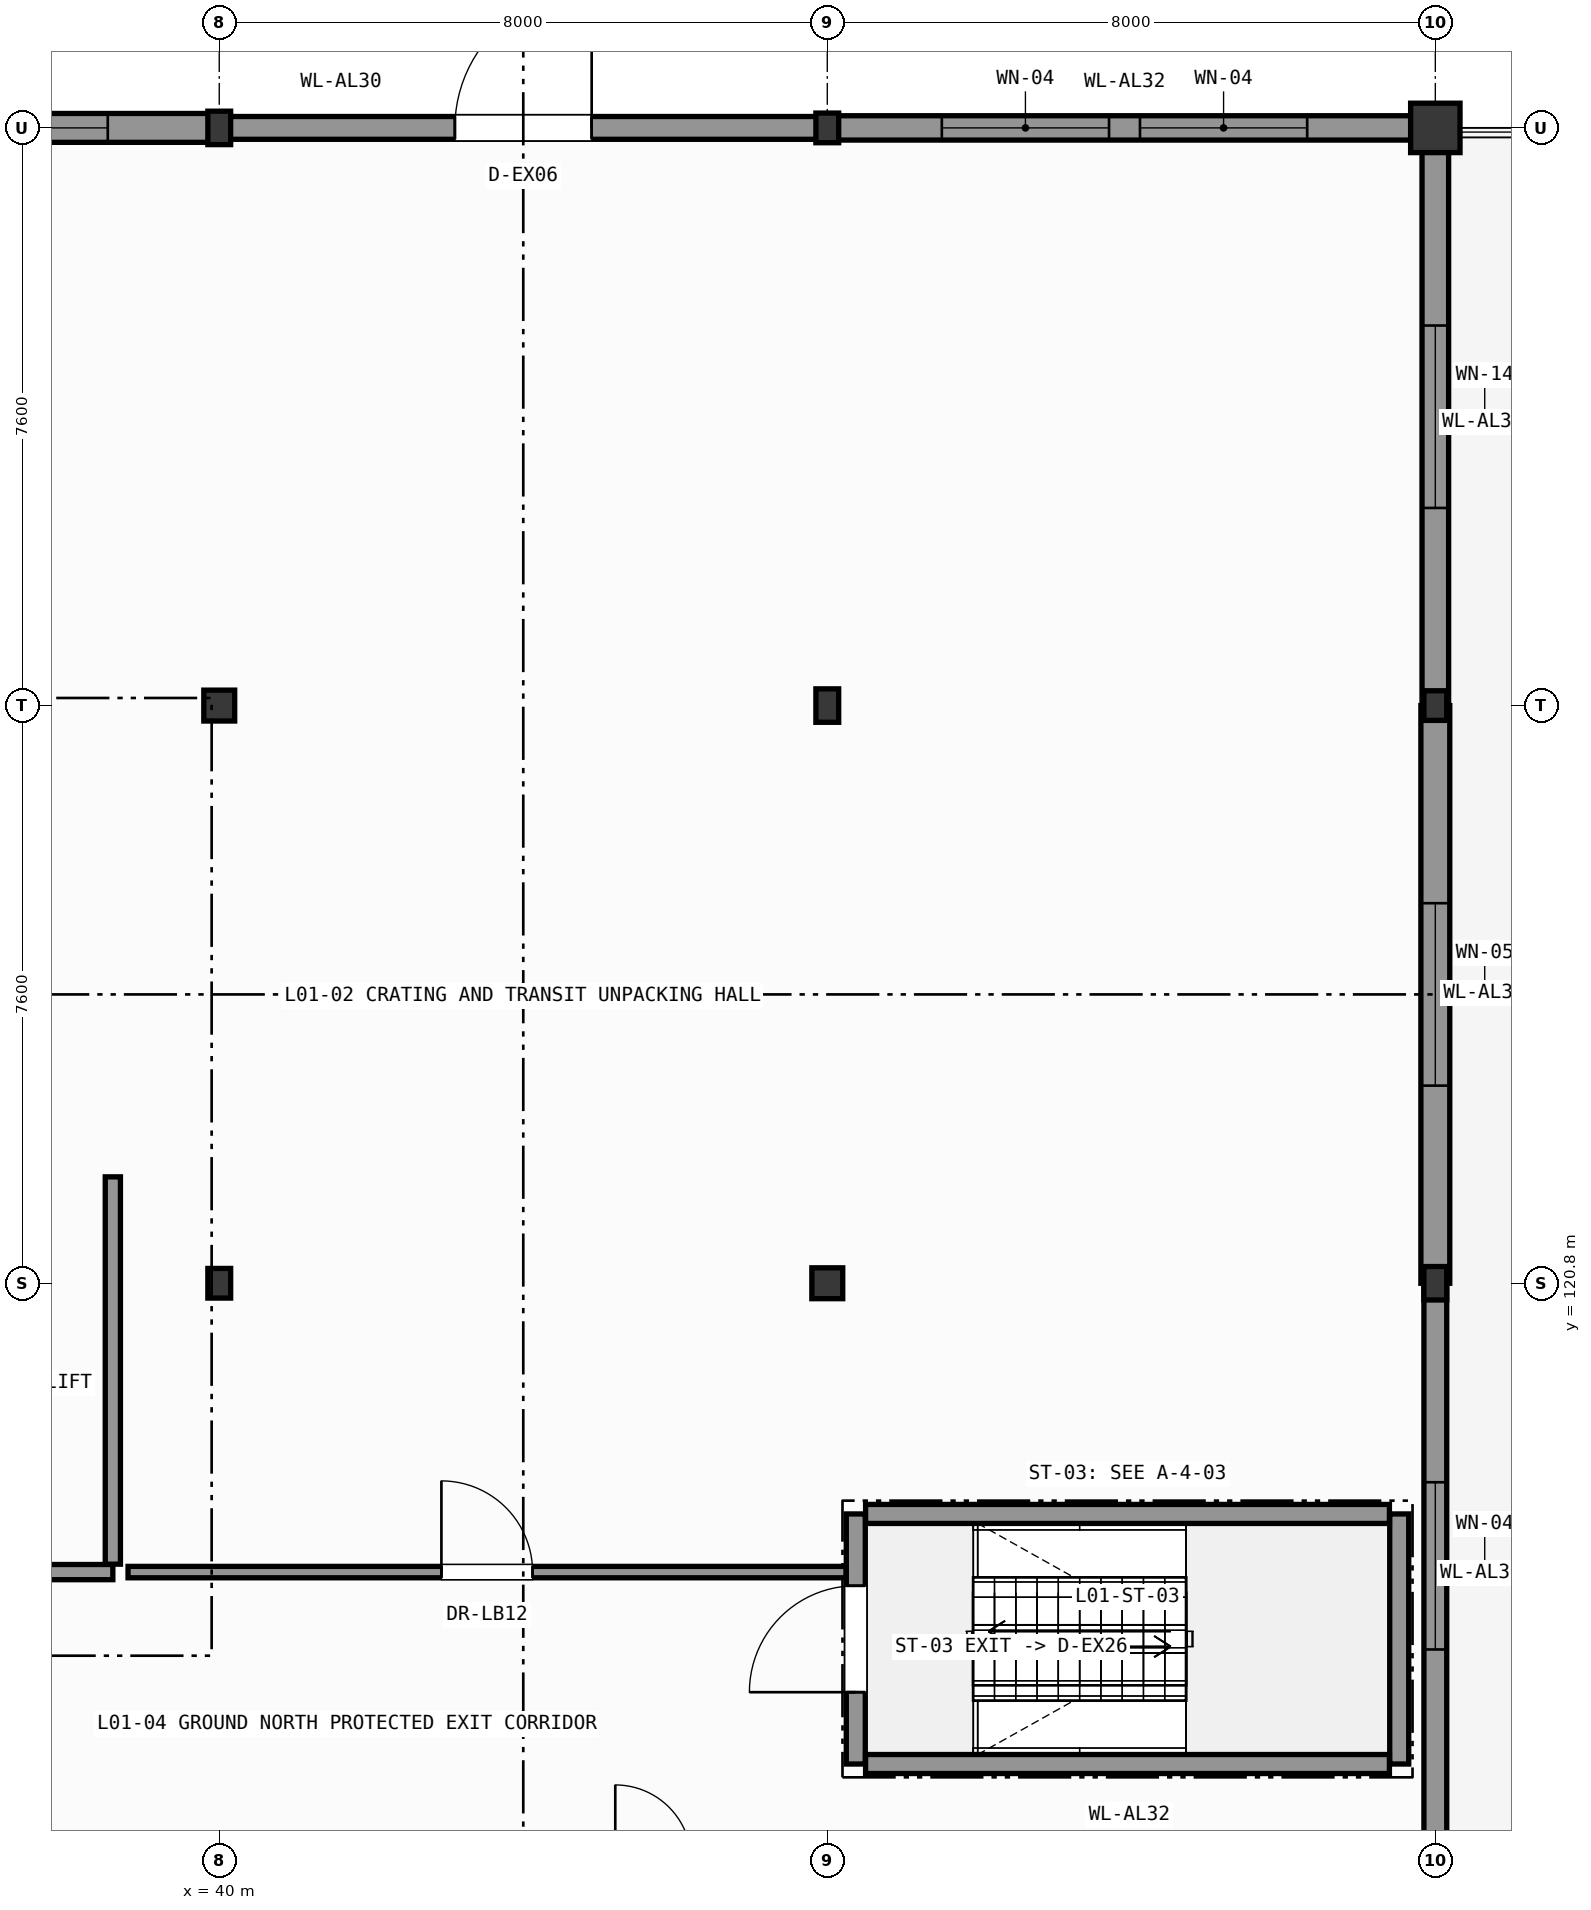
"""IFC4 building model, lengths in metres.
Left out: names, types, materials, properties, quantities, classifications, styles, units other than length and angle.
Written with IfcOpenShell. Run it as: python <this file> out.ifc"""

import sys

from ifc_helpers import new_model, si_unit, direction, frame, frame_2d, origin, origin_2d, place, context, subcontext, project, spatial, rectangle, hollow_circle, i_section, extrude, element, fill, save


model = new_model("IFC4")
c1 = context("Model", 3, precision=1e-05, world=origin(), true_north=direction((0.0, 1.0)))
c2 = subcontext(c1, "Body", "Model", "MODEL_VIEW")
j1 = project(units=[si_unit("LENGTHUNIT", "METRE"), si_unit("PLANEANGLEUNIT", "RADIAN")], contexts=[c1])
p1 = place(None, origin())
s1 = spatial("IfcSite", under=j1, at=p1, CompositionType="ELEMENT")
p2 = place(p1, origin())
s2 = spatial("IfcBuilding", under=s1, at=p2, CompositionType="ELEMENT")
p3 = place(p2, origin())
s3 = spatial("IfcBuildingStorey", under=s2, at=p3, CompositionType="ELEMENT", Elevation=0.0)
p4 = place(p3, frame((40.0, 120.8, 0.0), z_axis=(0.0, 0.0, 1.0), x_axis=(1.0, 0.0, 0.0)))
e1 = element("IfcColumn", 1, at=p4, inside=s3, PredefinedType="COLUMN", context=c2, shape_type="SweptSolid", body=[
    extrude(i_section(OverallWidth=0.3, OverallDepth=0.39, WebThickness=0.011, FlangeThickness=0.019, FilletRadius=0.027, at=origin_2d()), origin(), (0.0, 0.0, 1.0), 7.8),
])
p5 = place(p3, frame((40.0, 128.4, 0.0), z_axis=(0.0, 0.0, 1.0), x_axis=(1.0, 0.0, 0.0)))
e2 = element("IfcColumn", 2, at=p5, inside=s3, PredefinedType="COLUMN", context=c2, shape_type="SweptSolid", body=[
    extrude(hollow_circle(Radius=0.203, WallThickness=0.02, at=origin_2d()), origin(), (0.0, 0.0, 1.0), 7.8),
])
p6 = place(p3, frame((40.0, 136.0, 0.0), z_axis=(0.0, 0.0, 1.0), x_axis=(1.0, 0.0, 0.0)))
e3 = element("IfcColumn", 3, at=p6, inside=s3, PredefinedType="COLUMN", context=c2, shape_type="SweptSolid", body=[
    extrude(i_section(OverallWidth=0.3, OverallDepth=0.44, WebThickness=0.011, FlangeThickness=0.021, FilletRadius=0.027, at=origin_2d()), origin(), (0.0, 0.0, 1.0), 7.8),
])
p7 = place(p3, frame((48.0, 120.8, 0.0), z_axis=(0.0, 0.0, 1.0), x_axis=(1.0, 0.0, 0.0)))
e4 = element("IfcColumn", 4, at=p7, inside=s3, PredefinedType="COLUMN", context=c2, shape_type="SweptSolid", body=[
    extrude(hollow_circle(Radius=0.203, WallThickness=0.02, at=origin_2d()), origin(), (0.0, 0.0, 1.0), 7.8),
])
p8 = place(p3, frame((48.0, 128.4, 0.0), z_axis=(0.0, 0.0, 1.0), x_axis=(1.0, 0.0, 0.0)))
e5 = element("IfcColumn", 5, at=p8, inside=s3, PredefinedType="COLUMN", context=c2, shape_type="SweptSolid", body=[
    extrude(i_section(OverallWidth=0.3, OverallDepth=0.44, WebThickness=0.011, FlangeThickness=0.021, FilletRadius=0.027, at=origin_2d()), origin(), (0.0, 0.0, 1.0), 7.8),
])
p9 = place(p3, frame((48.0, 136.0, 0.0), z_axis=(0.0, 0.0, 1.0), x_axis=(1.0, 0.0, 0.0)))
e6 = element("IfcColumn", 6, at=p9, inside=s3, PredefinedType="COLUMN", context=c2, shape_type="SweptSolid", body=[
    extrude(i_section(OverallWidth=0.3, OverallDepth=0.39, WebThickness=0.011, FlangeThickness=0.019, FilletRadius=0.027, at=origin_2d()), origin(), (0.0, 0.0, 1.0), 7.8),
])
p10 = place(p3, frame((56.0, 120.8, 0.0), z_axis=(0.0, 0.0, 1.0), x_axis=(1.0, 0.0, 0.0)))
e7 = element("IfcColumn", 7, at=p10, inside=s3, PredefinedType="COLUMN", context=c2, shape_type="SweptSolid", body=[
    extrude(i_section(OverallWidth=0.3, OverallDepth=0.44, WebThickness=0.011, FlangeThickness=0.021, FilletRadius=0.027, at=origin_2d()), origin(), (0.0, 0.0, 1.0), 7.8),
])
p11 = place(p3, frame((56.0, 128.4, 0.0), z_axis=(0.0, 0.0, 1.0), x_axis=(1.0, 0.0, 0.0)))
e8 = element("IfcColumn", 8, at=p11, inside=s3, PredefinedType="COLUMN", context=c2, shape_type="SweptSolid", body=[
    extrude(i_section(OverallWidth=0.3, OverallDepth=0.39, WebThickness=0.011, FlangeThickness=0.019, FilletRadius=0.027, at=origin_2d()), origin(), (0.0, 0.0, 1.0), 7.8),
])
p12 = place(p3, frame((56.0, 136.0, 0.0), z_axis=(0.0, 0.0, 1.0), x_axis=(1.0, 0.0, 0.0)))
e9 = element("IfcColumn", 9, at=p12, inside=s3, PredefinedType="PILASTER", context=c2, shape_type="SweptSolid", body=[
    extrude(rectangle(XDim=0.65, YDim=0.65, at=origin_2d()), origin(), (0.0, 0.0, 1.0), 7.8),
])
p13 = place(p3, frame((56.0, 120.8, 0.0), z_axis=(0.0, 0.0, 1.0), x_axis=(0.0, -1.0, 0.0)))
e10 = element("IfcWall", 10, at=p13, inside=s3, PredefinedType="SOLIDWALL", context=c2, shape_type="SweptSolid", body=[
    extrude(rectangle(XDim=7.436, YDim=0.3, at=frame_2d((3.718, 0.0))), origin(), (0.0, 0.0, 1.0), 6.965),
])
p14 = place(p13, frame((2.618, 0.0, 0.95)))
e11 = element("IfcOpeningElement", 11, at=p14, cuts=e10, PredefinedType="OPENING", context=c2, shape_type="SweptSolid", body=[
    extrude(rectangle(XDim=2.2, YDim=4.2, at=frame_2d((1.1, 2.1))), frame((0.0, 0.16, 0.0), z_axis=(0.0, -1.0, 0.0), x_axis=(1.0, 0.0, 0.0)), (0.0, 0.0, 1.0), 0.32),
])
p15 = place(p3, frame((56.0, 128.4, 0.0), z_axis=(0.0, 0.0, 1.0), x_axis=(0.0, -1.0, 0.0)))
e12 = element("IfcWall", 12, at=p15, inside=s3, PredefinedType="SOLIDWALL", context=c2, shape_type="SweptSolid", body=[
    extrude(rectangle(XDim=7.6, YDim=0.38, at=frame_2d((3.8, 0.0))), origin(), (0.0, 0.0, 1.0), 6.965),
])
p16 = place(p15, frame((2.6, 0.0, 0.95)))
e13 = element("IfcOpeningElement", 13, at=p16, cuts=e12, PredefinedType="OPENING", context=c2, shape_type="SweptSolid", body=[
    extrude(rectangle(XDim=2.4, YDim=4.6, at=frame_2d((1.2, 2.3))), frame((0.0, 0.2, 0.0), z_axis=(0.0, -1.0, 0.0), x_axis=(1.0, 0.0, 0.0)), (0.0, 0.0, 1.0), 0.4),
])
p17 = place(p3, frame((56.0, 136.0, 0.0), z_axis=(0.0, 0.0, 1.0), x_axis=(0.0, -1.0, 0.0)))
e14 = element("IfcWall", 14, at=p17, inside=s3, PredefinedType="SOLIDWALL", context=c2, shape_type="SweptSolid", body=[
    extrude(rectangle(XDim=7.6, YDim=0.35, at=frame_2d((3.8, 0.0))), origin(), (0.0, 0.0, 1.0), 6.965),
])
p18 = place(p17, frame((2.6, 0.0, 0.95)))
e15 = element("IfcOpeningElement", 15, at=p18, cuts=e14, PredefinedType="OPENING", context=c2, shape_type="SweptSolid", body=[
    extrude(rectangle(XDim=2.4, YDim=3.0, at=frame_2d((1.2, 1.5))), frame((0.0, 0.185, 0.0), z_axis=(0.0, -1.0, 0.0), x_axis=(1.0, 0.0, 0.0)), (0.0, 0.0, 1.0), 0.37),
])
p19 = place(p3, frame((48.0, 136.0, 0.0), z_axis=(0.0, 0.0, 1.0), x_axis=(1.0, 0.0, 0.0)))
e16 = element("IfcWall", 16, at=p19, inside=s3, PredefinedType="SOLIDWALL", context=c2, shape_type="SweptSolid", body=[
    extrude(rectangle(XDim=7.821, YDim=0.32, at=frame_2d((3.911, 0.0))), origin(), (0.0, 0.0, 1.0), 7.075),
])
p20 = place(p19, frame((1.507, 0.0, 0.95)))
e17 = element("IfcOpeningElement", 17, at=p20, cuts=e16, PredefinedType="OPENING", context=c2, shape_type="SweptSolid", body=[
    extrude(rectangle(XDim=2.2, YDim=4.2, at=frame_2d((1.1, 2.1))), frame((0.0, 0.17, 0.0), z_axis=(0.0, -1.0, 0.0), x_axis=(1.0, 0.0, 0.0)), (0.0, 0.0, 1.0), 0.34),
])
p21 = place(p19, frame((4.114, 0.0, 0.95)))
e18 = element("IfcOpeningElement", 18, at=p21, cuts=e16, PredefinedType="OPENING", context=c2, shape_type="SweptSolid", body=[
    extrude(rectangle(XDim=2.2, YDim=4.2, at=frame_2d((1.1, 2.1))), frame((0.0, 0.17, 0.0), z_axis=(0.0, -1.0, 0.0), x_axis=(1.0, 0.0, 0.0)), (0.0, 0.0, 1.0), 0.34),
])
p22 = place(p3, frame((40.0, 136.0, 0.0), z_axis=(0.0, 0.0, 1.0), x_axis=(1.0, 0.0, 0.0)))
e19 = element("IfcWall", 19, at=p22, inside=s3, PredefinedType="SOLIDWALL", context=c2, shape_type="SweptSolid", body=[
    extrude(rectangle(XDim=8.0, YDim=0.3, at=frame_2d((4.0, 0.0))), origin(), (0.0, 0.0, 1.0), 7.075),
])
p23 = place(p22, frame((3.1, 0.0, 0.0)))
e20 = element("IfcOpeningElement", 20, at=p23, cuts=e19, PredefinedType="OPENING", context=c2, shape_type="SweptSolid", body=[
    extrude(rectangle(XDim=1.8, YDim=2.4, at=frame_2d((0.9, 1.2))), frame((0.0, 0.16, 0.0), z_axis=(0.0, -1.0, 0.0), x_axis=(1.0, 0.0, 0.0)), (0.0, 0.0, 1.0), 0.32),
])
p24 = place(p3, frame((32.0, 136.0, 0.0), z_axis=(0.0, 0.0, 1.0), x_axis=(1.0, 0.0, 0.0)))
e21 = element("IfcWall", 21, at=p24, inside=s3, PredefinedType="SOLIDWALL", context=c2, shape_type="SweptSolid", body=[
    extrude(rectangle(XDim=8.0, YDim=0.38, at=frame_2d((4.0, 0.0))), origin(), (0.0, 0.0, 1.0), 7.075),
])
p25 = place(p24, frame((1.467, 0.0, 0.95)))
e22 = element("IfcOpeningElement", 22, at=p25, cuts=e21, PredefinedType="OPENING", context=c2, shape_type="SweptSolid", body=[
    extrude(rectangle(XDim=2.4, YDim=3.0, at=frame_2d((1.2, 1.5))), frame((0.0, 0.2, 0.0), z_axis=(0.0, -1.0, 0.0), x_axis=(1.0, 0.0, 0.0)), (0.0, 0.0, 1.0), 0.4),
])
p26 = place(p24, frame((4.133, 0.0, 0.95)))
e23 = element("IfcOpeningElement", 23, at=p26, cuts=e21, PredefinedType="OPENING", context=c2, shape_type="SweptSolid", body=[
    extrude(rectangle(XDim=2.4, YDim=3.0, at=frame_2d((1.2, 1.5))), frame((0.0, 0.2, 0.0), z_axis=(0.0, -1.0, 0.0), x_axis=(1.0, 0.0, 0.0)), (0.0, 0.0, 1.0), 0.4),
])
p27 = place(p3, frame((48.375, 114.475, 0.0), z_axis=(0.0, 0.0, 1.0), x_axis=(0.0, 1.0, 0.0)))
e24 = element("IfcWall", 24, at=p27, inside=s3, PredefinedType="SHEAR", context=c2, shape_type="SweptSolid", body=[
    extrude(rectangle(XDim=3.29, YDim=0.25, at=frame_2d((1.645, 0.0))), origin(), (0.0, 0.0, 1.0), 7.54),
])
p28 = place(p27, frame((0.945, 0.0, 0.0)))
e25 = element("IfcOpeningElement", 25, at=p28, cuts=e24, PredefinedType="OPENING", context=c2, shape_type="SweptSolid", body=[
    extrude(rectangle(XDim=1.4, YDim=2.2, at=frame_2d((0.7, 1.1))), frame((0.0, 0.135, 0.0), z_axis=(0.0, -1.0, 0.0), x_axis=(1.0, 0.0, 0.0)), (0.0, 0.0, 1.0), 0.27),
])
p29 = place(p3, frame((55.525, 114.475, 0.0), z_axis=(0.0, 0.0, 1.0), x_axis=(0.0, 1.0, 0.0)))
e26 = element("IfcWall", 26, at=p29, inside=s3, PredefinedType="SHEAR", context=c2, shape_type="SweptSolid", body=[
    extrude(rectangle(XDim=3.29, YDim=0.25, at=frame_2d((1.645, 0.0))), origin(), (0.0, 0.0, 1.0), 7.54),
])
for number, where, z_axis, x_axis in (
    (27, (48.504, 114.475, 0.0), (0.0, 0.0, 1.0), (1.0, 0.0, 0.0)),
    (28, (48.504, 117.765, 0.0), (0.0, 0.0, 1.0), (1.0, 0.0, 0.0)),
):
    element("IfcWall", number, at=place(p3, frame(where, z_axis=z_axis, x_axis=x_axis)), inside=s3, PredefinedType="SHEAR", context=c2, shape_type="SweptSolid", body=[
        extrude(rectangle(XDim=6.892, YDim=0.25, at=frame_2d((3.446, 0.0))), origin(), (0.0, 0.0, 1.0), 7.54),
    ])
p30 = place(p3, frame((33.0, 117.0, 0.0), z_axis=(0.0, 0.0, 1.0), x_axis=(1.0, 0.0, 0.0)))
e29 = element("IfcWall", 29, at=p30, inside=s3, PredefinedType="PARTITIONING", context=c2, shape_type="SweptSolid", body=[
    extrude(rectangle(XDim=5.6, YDim=0.2, at=frame_2d((2.8, 0.0))), origin(), (0.0, 0.0, 1.0), 7.54),
])
p31 = place(p30, frame((2.05, 0.0, 0.0)))
e30 = element("IfcOpeningElement", 30, at=p31, cuts=e29, PredefinedType="OPENING", context=c2, shape_type="SweptSolid", body=[
    extrude(rectangle(XDim=1.5, YDim=2.2, at=frame_2d((0.75, 1.1))), frame((0.0, 0.11, 0.0), z_axis=(0.0, -1.0, 0.0), x_axis=(1.0, 0.0, 0.0)), (0.0, 0.0, 1.0), 0.22),
])
p32 = place(p3, frame((38.6, 117.104, 0.0), z_axis=(0.0, 0.0, 1.0), x_axis=(0.0, 1.0, 0.0)))
e31 = element("IfcWall", 31, at=p32, inside=s3, PredefinedType="PARTITIONING", context=c2, shape_type="SweptSolid", body=[
    extrude(rectangle(XDim=5.096, YDim=0.2, at=frame_2d((2.548, 0.0))), origin(), (0.0, 0.0, 1.0), 7.54),
])
p33 = place(p3, frame((38.8, 117.0, 0.0), z_axis=(0.0, 0.0, 1.0), x_axis=(1.0, 0.0, 0.0)))
e32 = element("IfcWall", 32, at=p33, inside=s3, PredefinedType="PARTITIONING", context=c2, shape_type="SweptSolid", body=[
    extrude(rectangle(XDim=9.446, YDim=0.15, at=frame_2d((4.723, 0.0))), origin(), (0.0, 0.0, 1.0), 7.54),
])
p34 = place(p33, frame((4.123, 0.0, 0.0)))
e33 = element("IfcOpeningElement", 33, at=p34, cuts=e32, PredefinedType="OPENING", context=c2, shape_type="SweptSolid", body=[
    extrude(rectangle(XDim=1.2, YDim=2.2, at=frame_2d((0.6, 1.1))), frame((0.0, 0.085, 0.0), z_axis=(0.0, -1.0, 0.0), x_axis=(1.0, 0.0, 0.0)), (0.0, 0.0, 1.0), 0.17),
])
p35 = place(p14, origin())
e34 = element("IfcWindow", 34, at=p35, inside=s3, PartitioningType="SINGLE_PANEL", PredefinedType="WINDOW", context=c2, shape_type="SweptSolid", body=[
    extrude(rectangle(XDim=2.2, YDim=4.2, at=frame_2d((1.1, 2.1))), frame((0.0, 0.03, 0.0), z_axis=(0.0, -1.0, 0.0), x_axis=(1.0, 0.0, 0.0)), (0.0, 0.0, 1.0), 0.06),
])
fill(e11, e34)
p36 = place(p16, origin())
e35 = element("IfcWindow", 35, at=p36, inside=s3, PartitioningType="SINGLE_PANEL", PredefinedType="WINDOW", context=c2, shape_type="SweptSolid", body=[
    extrude(rectangle(XDim=2.4, YDim=4.6, at=frame_2d((1.2, 2.3))), frame((0.0, 0.03, 0.0), z_axis=(0.0, -1.0, 0.0), x_axis=(1.0, 0.0, 0.0)), (0.0, 0.0, 1.0), 0.06),
])
fill(e13, e35)
p37 = place(p18, origin())
e36 = element("IfcWindow", 36, at=p37, inside=s3, PartitioningType="SINGLE_PANEL", PredefinedType="WINDOW", context=c2, shape_type="SweptSolid", body=[
    extrude(rectangle(XDim=2.4, YDim=3.0, at=frame_2d((1.2, 1.5))), frame((0.0, 0.03, 0.0), z_axis=(0.0, -1.0, 0.0), x_axis=(1.0, 0.0, 0.0)), (0.0, 0.0, 1.0), 0.06),
])
fill(e15, e36)
p38 = place(p20, origin())
e37 = element("IfcWindow", 37, at=p38, inside=s3, PartitioningType="SINGLE_PANEL", PredefinedType="WINDOW", context=c2, shape_type="SweptSolid", body=[
    extrude(rectangle(XDim=2.2, YDim=4.2, at=frame_2d((1.1, 2.1))), frame((0.0, 0.03, 0.0), z_axis=(0.0, -1.0, 0.0), x_axis=(1.0, 0.0, 0.0)), (0.0, 0.0, 1.0), 0.06),
])
fill(e17, e37)
p39 = place(p21, origin())
e38 = element("IfcWindow", 38, at=p39, inside=s3, PartitioningType="SINGLE_PANEL", PredefinedType="WINDOW", context=c2, shape_type="SweptSolid", body=[
    extrude(rectangle(XDim=2.2, YDim=4.2, at=frame_2d((1.1, 2.1))), frame((0.0, 0.03, 0.0), z_axis=(0.0, -1.0, 0.0), x_axis=(1.0, 0.0, 0.0)), (0.0, 0.0, 1.0), 0.06),
])
fill(e18, e38)
p40 = place(p23, origin())
e39 = element("IfcDoor", 39, at=p40, inside=s3, OperationType="SINGLE_SWING_RIGHT", PredefinedType="DOOR", context=c2, shape_type="SweptSolid", body=[
    extrude(rectangle(XDim=1.8, YDim=2.4, at=frame_2d((0.9, 1.2))), frame((0.0, 0.025, 0.0), z_axis=(0.0, -1.0, 0.0), x_axis=(1.0, 0.0, 0.0)), (0.0, 0.0, 1.0), 0.05),
])
fill(e20, e39)
p41 = place(p26, origin())
e40 = element("IfcWindow", 40, at=p41, inside=s3, PartitioningType="SINGLE_PANEL", PredefinedType="WINDOW", context=c2, shape_type="SweptSolid", body=[
    extrude(rectangle(XDim=2.4, YDim=3.0, at=frame_2d((1.2, 1.5))), frame((0.0, 0.03, 0.0), z_axis=(0.0, -1.0, 0.0), x_axis=(1.0, 0.0, 0.0)), (0.0, 0.0, 1.0), 0.06),
])
fill(e23, e40)
p42 = place(p28, origin())
e41 = element("IfcDoor", 41, at=p42, inside=s3, OperationType="SINGLE_SWING_LEFT", PredefinedType="DOOR", context=c2, shape_type="SweptSolid", body=[
    extrude(rectangle(XDim=1.4, YDim=2.2, at=frame_2d((0.7, 1.1))), frame((0.0, 0.025, 0.0), z_axis=(0.0, -1.0, 0.0), x_axis=(1.0, 0.0, 0.0)), (0.0, 0.0, 1.0), 0.05),
])
fill(e25, e41)
p43 = place(p34, origin())
e42 = element("IfcDoor", 42, at=p43, inside=s3, OperationType="SINGLE_SWING_LEFT", PredefinedType="DOOR", context=c2, shape_type="SweptSolid", body=[
    extrude(rectangle(XDim=1.2, YDim=2.2, at=frame_2d((0.6, 1.1))), frame((0.0, 0.025, 0.0), z_axis=(0.0, -1.0, 0.0), x_axis=(1.0, 0.0, 0.0)), (0.0, 0.0, 1.0), 0.05),
])
fill(e33, e42)
save(model, sys.argv[1])
